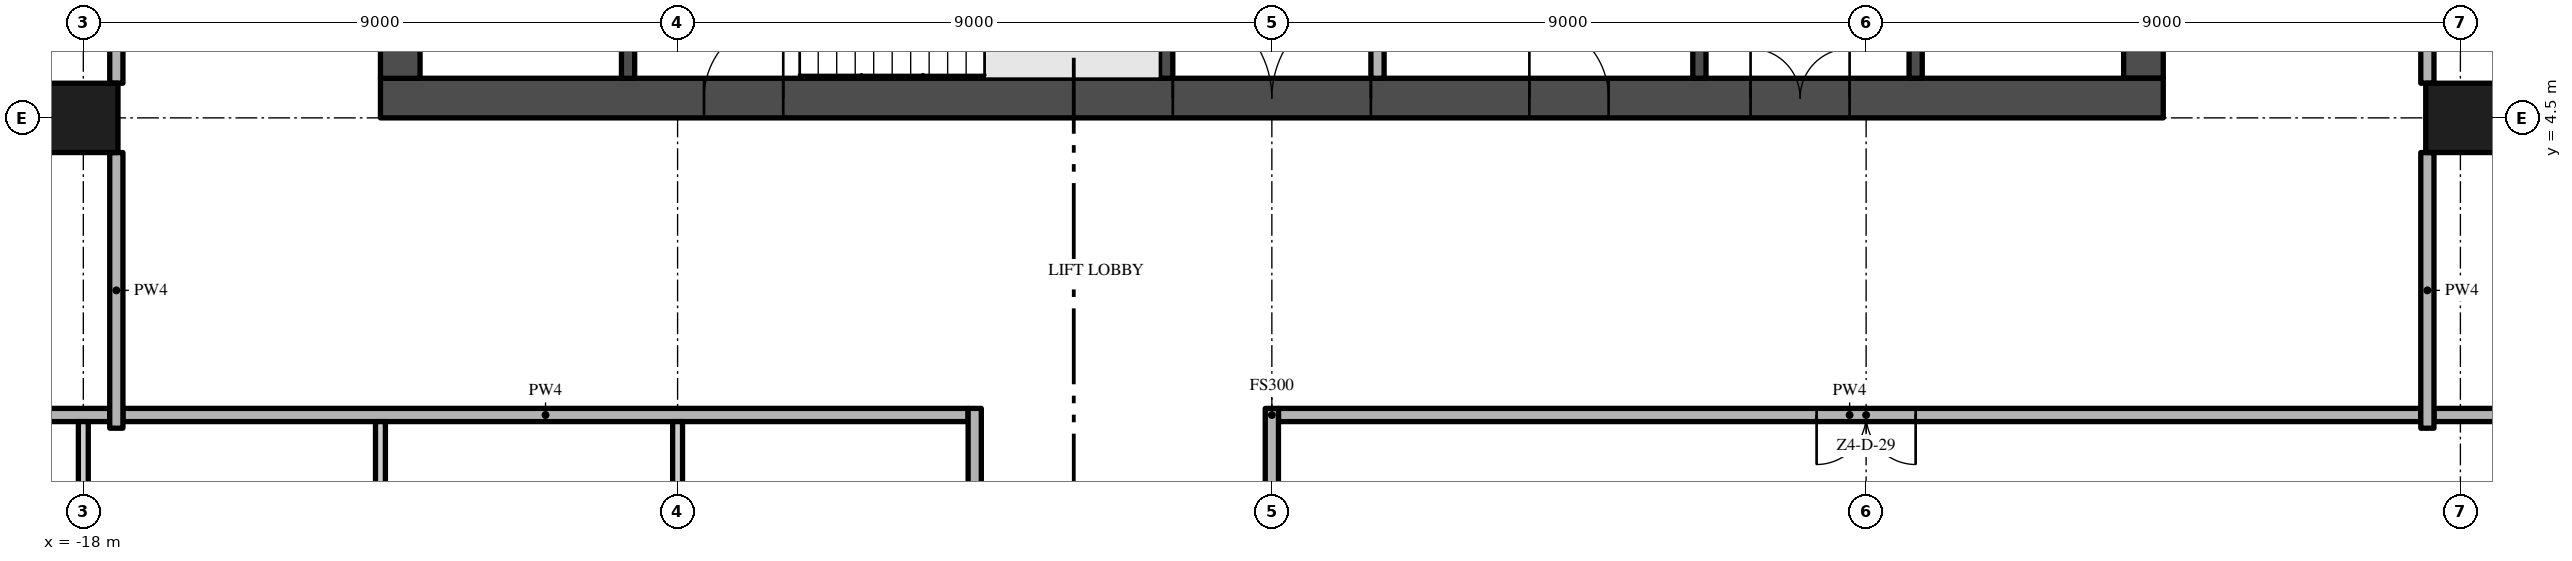
"""IFC4 building model, lengths in metres.
Left out: names, types, materials, properties, quantities, classifications, styles, units other than length and angle.
Written with IfcOpenShell. Run it as: python <this file> out.ifc"""

import sys

from ifc_helpers import new_model, si_unit, direction, frame, frame_2d, origin, origin_2d, place, context, subcontext, project, spatial, rectangle, extrude, element, fill, save


model = new_model("IFC4")
c1 = context("Model", 3, precision=1e-05, world=origin(), true_north=direction((0.0, 1.0)))
c2 = subcontext(c1, "Body", "Model", "MODEL_VIEW")
j1 = project(units=[si_unit("LENGTHUNIT", "METRE"), si_unit("PLANEANGLEUNIT", "RADIAN")], contexts=[c1])
p1 = place(None, origin())
s1 = spatial("IfcSite", under=j1, at=p1, CompositionType="ELEMENT")
p2 = place(p1, origin())
s2 = spatial("IfcBuilding", under=s1, at=p2, CompositionType="ELEMENT")
p3 = place(p2, frame((0.0, 0.0, 222.4)))
s3 = spatial("IfcBuildingStorey", under=s2, at=p3, CompositionType="ELEMENT", Elevation=222.4)
p4 = place(p3, frame((-13.5, 4.8, -0.3), z_axis=(0.0, 0.0, 1.0), x_axis=(1.0, 0.0, 0.0)))
e1 = element("IfcWall", 1, at=p4, inside=s3, PredefinedType="SHEAR", context=c2, shape_type="SweptSolid", body=[
    extrude(rectangle(XDim=27.0, YDim=0.6, at=frame_2d((13.5, 0.0))), origin(), (0.0, 0.0, 1.0), 3.8),
])
p5 = place(p4, frame((12.0, 0.0, 0.3)))
e2 = element("IfcOpeningElement", 2, at=p5, cuts=e1, PredefinedType="OPENING", context=c2, shape_type="SweptSolid", body=[
    extrude(rectangle(XDim=3.0, YDim=2.4, at=frame_2d((1.5, 1.2))), frame((0.0, 0.31, 0.0), z_axis=(0.0, -1.0, 0.0), x_axis=(1.0, 0.0, 0.0)), (0.0, 0.0, 1.0), 0.62),
])
p6 = place(p4, frame((4.9, 0.0, 0.3)))
e3 = element("IfcOpeningElement", 3, at=p6, cuts=e1, PredefinedType="OPENING", context=c2, shape_type="SweptSolid", body=[
    extrude(rectangle(XDim=1.2, YDim=2.2, at=frame_2d((0.6, 1.1))), frame((0.0, 0.31, 0.0), z_axis=(0.0, -1.0, 0.0), x_axis=(1.0, 0.0, 0.0)), (0.0, 0.0, 1.0), 0.62),
])
p7 = place(p4, frame((20.75, 0.0, 0.3)))
e4 = element("IfcOpeningElement", 4, at=p7, cuts=e1, PredefinedType="OPENING", context=c2, shape_type="SweptSolid", body=[
    extrude(rectangle(XDim=1.5, YDim=2.2, at=frame_2d((0.75, 1.1))), frame((0.0, 0.31, 0.0), z_axis=(0.0, -1.0, 0.0), x_axis=(1.0, 0.0, 0.0)), (0.0, 0.0, 1.0), 0.62),
])
p8 = place(p4, frame((17.4, 0.0, 0.3)))
e5 = element("IfcOpeningElement", 5, at=p8, cuts=e1, PredefinedType="OPENING", context=c2, shape_type="SweptSolid", body=[
    extrude(rectangle(XDim=1.2, YDim=2.2, at=frame_2d((0.6, 1.1))), frame((0.0, 0.31, 0.0), z_axis=(0.0, -1.0, 0.0), x_axis=(1.0, 0.0, 0.0)), (0.0, 0.0, 1.0), 0.62),
])
p9 = place(p3, frame((13.2, 5.1, -0.3), z_axis=(0.0, 0.0, 1.0), x_axis=(0.0, 1.0, 0.0)))
e6 = element("IfcWall", 6, at=p9, inside=s3, PredefinedType="SHEAR", context=c2, shape_type="SweptSolid", body=[
    extrude(rectangle(XDim=16.8, YDim=0.6, at=frame_2d((8.4, 0.0))), origin(), (0.0, 0.0, 1.0), 3.8),
])
p10 = place(p9, frame((6.3, 0.0, 0.3)))
e7 = element("IfcOpeningElement", 7, at=p10, cuts=e6, PredefinedType="OPENING", context=c2, shape_type="SweptSolid", body=[
    extrude(rectangle(XDim=1.2, YDim=2.2, at=frame_2d((0.6, 1.1))), frame((0.0, 0.31, 0.0), z_axis=(0.0, -1.0, 0.0), x_axis=(1.0, 0.0, 0.0)), (0.0, 0.0, 1.0), 0.62),
])
p11 = place(p3, frame((-13.2, 21.9, -0.3), z_axis=(0.0, 0.0, 1.0), x_axis=(0.0, -1.0, 0.0)))
e8 = element("IfcWall", 8, at=p11, inside=s3, PredefinedType="SHEAR", context=c2, shape_type="SweptSolid", body=[
    extrude(rectangle(XDim=16.8, YDim=0.6, at=frame_2d((8.4, 0.0))), origin(), (0.0, 0.0, 1.0), 3.8),
])
p12 = place(p11, frame((9.3, 0.0, 0.3)))
e9 = element("IfcOpeningElement", 9, at=p12, cuts=e8, PredefinedType="OPENING", context=c2, shape_type="SweptSolid", body=[
    extrude(rectangle(XDim=1.2, YDim=2.2, at=frame_2d((0.6, 1.1))), frame((0.0, 0.31, 0.0), z_axis=(0.0, -1.0, 0.0), x_axis=(1.0, 0.0, 0.0)), (0.0, 0.0, 1.0), 0.62),
])
for number, where, z_axis, x_axis in (
    (10, (-18.0, 4.5, 0.0), (0.0, 0.0, 1.0), (1.0, 0.0, 0.0)),
    (11, (18.0, 4.5, 0.0), (0.0, 0.0, 1.0), (1.0, 0.0, 0.0)),
):
    element("IfcColumn", number, at=place(p3, frame(where, z_axis=z_axis, x_axis=x_axis)), inside=s3, PredefinedType="COLUMN", context=c2, shape_type="SweptSolid", body=[
        extrude(rectangle(XDim=1.05, YDim=1.05, at=origin_2d()), origin(), (0.0, 0.0, 1.0), 3.5),
    ])
for number, where, z_axis, x_axis in (
    (12, (-9.75, 5.1, 0.0), (0.0, 0.0, 1.0), (0.0, 1.0, 0.0)),
    (13, (-1.6, 5.1, 0.0), (0.0, 0.0, 1.0), (0.0, 1.0, 0.0)),
):
    element("IfcWall", number, at=place(p3, frame(where, z_axis=z_axis, x_axis=x_axis)), inside=s3, PredefinedType="SHEAR", context=c2, shape_type="SweptSolid", body=[
        extrude(rectangle(XDim=2.85, YDim=0.2, at=frame_2d((1.425, 0.0))), origin(), (0.0, 0.0, 1.0), 3.5),
    ])
p13 = place(p3, frame((1.6, 7.5, 0.0), z_axis=(0.0, 0.0, 1.0), x_axis=(0.0, -1.0, 0.0)))
e14 = element("IfcWall", 14, at=p13, inside=s3, PredefinedType="PARTITIONING", context=c2, shape_type="SweptSolid", body=[
    extrude(rectangle(XDim=2.4, YDim=0.2, at=frame_2d((1.2, 0.0))), origin(), (0.0, 0.0, 1.0), 3.5),
])
p14 = place(p13, frame((0.35, 0.0, 0.0)))
e15 = element("IfcOpeningElement", 15, at=p14, cuts=e14, PredefinedType="OPENING", context=c2, shape_type="SweptSolid", body=[
    extrude(rectangle(XDim=0.9, YDim=2.1, at=frame_2d((0.45, 1.05))), frame((0.0, 0.11, 0.0), z_axis=(0.0, -1.0, 0.0), x_axis=(1.0, 0.0, 0.0)), (0.0, 0.0, 1.0), 0.22),
])
p15 = place(p3, frame((6.475, 5.1, 0.0), z_axis=(0.0, 0.0, 1.0), x_axis=(0.0, 1.0, 0.0)))
e16 = element("IfcWall", 16, at=p15, inside=s3, PredefinedType="SHEAR", context=c2, shape_type="SweptSolid", body=[
    extrude(rectangle(XDim=2.4, YDim=0.2, at=frame_2d((1.2, 0.0))), origin(), (0.0, 0.0, 1.0), 3.5),
])
p16 = place(p3, frame((9.75, 5.1, 0.0), z_axis=(0.0, 0.0, 1.0), x_axis=(0.0, 1.0, 0.0)))
e17 = element("IfcWall", 17, at=p16, inside=s3, PredefinedType="SHEAR", context=c2, shape_type="SweptSolid", body=[
    extrude(rectangle(XDim=2.5, YDim=0.2, at=frame_2d((1.25, 0.0))), origin(), (0.0, 0.0, 1.0), 3.5),
])
p17 = place(p16, frame((0.85, 0.0, 0.0)))
e18 = element("IfcOpeningElement", 18, at=p17, cuts=e17, PredefinedType="OPENING", context=c2, shape_type="SweptSolid", body=[
    extrude(rectangle(XDim=1.1, YDim=2.1, at=frame_2d((0.55, 1.05))), frame((0.0, 0.11, 0.0), z_axis=(0.0, -1.0, 0.0), x_axis=(1.0, 0.0, 0.0)), (0.0, 0.0, 1.0), 0.22),
])
p18 = place(p3, frame((-17.4, 0.0, 0.0), z_axis=(0.0, 0.0, 1.0), x_axis=(1.0, 0.0, 0.0)))
e19 = element("IfcWall", 19, at=p18, inside=s3, PredefinedType="PARTITIONING", context=c2, shape_type="SweptSolid", body=[
    extrude(rectangle(XDim=12.8, YDim=0.2, at=frame_2d((6.4, 0.0))), origin(), (0.0, 0.0, 1.0), 3.5),
])
p19 = place(p3, frame((17.4, 0.0, 0.0), z_axis=(0.0, 0.0, 1.0), x_axis=(-1.0, 0.0, 0.0)))
e20 = element("IfcWall", 20, at=p19, inside=s3, PredefinedType="PARTITIONING", context=c2, shape_type="SweptSolid", body=[
    extrude(rectangle(XDim=17.3, YDim=0.2, at=frame_2d((8.65, 0.0))), origin(), (0.0, 0.0, 1.0), 3.5),
])
p20 = place(p19, frame((7.65, 0.0, 0.0)))
e21 = element("IfcOpeningElement", 21, at=p20, cuts=e20, PredefinedType="OPENING", context=c2, shape_type="SweptSolid", body=[
    extrude(rectangle(XDim=1.5, YDim=2.4, at=frame_2d((0.75, 1.2))), frame((0.0, 0.11, 0.0), z_axis=(0.0, -1.0, 0.0), x_axis=(1.0, 0.0, 0.0)), (0.0, 0.0, 1.0), 0.22),
])
for number, where, z_axis, x_axis in (
    (22, (-26.7, 0.0, 0.0), (0.0, 0.0, 1.0), (1.0, 0.0, 0.0)),
    (23, (17.6, 0.0, 0.0), (0.0, 0.0, 1.0), (1.0, 0.0, 0.0)),
):
    element("IfcWall", number, at=place(p3, frame(where, z_axis=z_axis, x_axis=x_axis)), inside=s3, PredefinedType="PARTITIONING", context=c2, shape_type="SweptSolid", body=[
        extrude(rectangle(XDim=9.1, YDim=0.2, at=frame_2d((4.55, 0.0))), origin(), (0.0, 0.0, 1.0), 3.5),
    ])
p21 = place(p3, frame((-18.0, -3.975, 0.0), z_axis=(0.0, 0.0, 1.0), x_axis=(0.0, 1.0, 0.0)))
e24 = element("IfcWall", 24, at=p21, inside=s3, PredefinedType="PARTITIONING", context=c2, shape_type="SweptSolid", body=[
    extrude(rectangle(XDim=3.875, YDim=0.15, at=frame_2d((1.938, 0.0))), origin(), (0.0, 0.0, 1.0), 3.5),
])
p22 = place(p21, frame((1.0, 0.0, 0.0)))
e25 = element("IfcOpeningElement", 25, at=p22, cuts=e24, PredefinedType="OPENING", context=c2, shape_type="SweptSolid", body=[
    extrude(rectangle(XDim=1.5, YDim=2.4, at=frame_2d((0.75, 1.2))), frame((0.0, 0.085, 0.0), z_axis=(0.0, -1.0, 0.0), x_axis=(1.0, 0.0, 0.0)), (0.0, 0.0, 1.0), 0.17),
])
p23 = place(p3, frame((-17.5, -0.2, 0.0), z_axis=(0.0, 0.0, 1.0), x_axis=(0.0, 1.0, 0.0)))
e26 = element("IfcWall", 26, at=p23, inside=s3, PredefinedType="PARTITIONING", context=c2, shape_type="SweptSolid", body=[
    extrude(rectangle(XDim=4.175, YDim=0.2, at=frame_2d((2.087, 0.0))), origin(), (0.0, 0.0, 1.0), 3.5),
])
p24 = place(p3, frame((-17.5, 5.025, 0.0), z_axis=(0.0, 0.0, 1.0), x_axis=(0.0, 1.0, 0.0)))
e27 = element("IfcWall", 27, at=p24, inside=s3, PredefinedType="PARTITIONING", context=c2, shape_type="SweptSolid", body=[
    extrude(rectangle(XDim=7.95, YDim=0.2, at=frame_2d((3.975, 0.0))), origin(), (0.0, 0.0, 1.0), 3.5),
])
p25 = place(p3, frame((-13.5, -0.1, 0.0), z_axis=(0.0, 0.0, 1.0), x_axis=(0.0, -1.0, 0.0)))
e28 = element("IfcWall", 28, at=p25, inside=s3, PredefinedType="PARTITIONING", context=c2, shape_type="SweptSolid", body=[
    extrude(rectangle(XDim=8.525, YDim=0.15, at=frame_2d((4.263, 0.0))), origin(), (0.0, 0.0, 1.0), 3.5),
])
p26 = place(p25, frame((4.0, 0.0, 0.0)))
e29 = element("IfcOpeningElement", 29, at=p26, cuts=e28, PredefinedType="OPENING", context=c2, shape_type="SweptSolid", body=[
    extrude(rectangle(XDim=0.8, YDim=2.0, at=frame_2d((0.4, 1.0))), frame((0.0, 0.085, 0.0), z_axis=(0.0, -1.0, 0.0), x_axis=(1.0, 0.0, 0.0)), (0.0, 0.0, 1.0), 0.17),
])
p27 = place(p3, frame((-9.0, -3.975, 0.0), z_axis=(0.0, 0.0, 1.0), x_axis=(0.0, 1.0, 0.0)))
e30 = element("IfcWall", 30, at=p27, inside=s3, PredefinedType="PARTITIONING", context=c2, shape_type="SweptSolid", body=[
    extrude(rectangle(XDim=3.875, YDim=0.15, at=frame_2d((1.938, 0.0))), origin(), (0.0, 0.0, 1.0), 3.5),
])
p28 = place(p27, frame((2.025, 0.0, 0.0)))
e31 = element("IfcOpeningElement", 31, at=p28, cuts=e30, PredefinedType="OPENING", context=c2, shape_type="SweptSolid", body=[
    extrude(rectangle(XDim=0.9, YDim=2.1, at=frame_2d((0.45, 1.05))), frame((0.0, 0.085, 0.0), z_axis=(0.0, -1.0, 0.0), x_axis=(1.0, 0.0, 0.0)), (0.0, 0.0, 1.0), 0.17),
])
p29 = place(p3, frame((-4.5, -22.2, 0.0), z_axis=(0.0, 0.0, 1.0), x_axis=(0.0, 1.0, 0.0)))
e32 = element("IfcWall", 32, at=p29, inside=s3, PredefinedType="PARTITIONING", context=c2, shape_type="SweptSolid", body=[
    extrude(rectangle(XDim=22.3, YDim=0.2, at=frame_2d((11.15, 0.0))), origin(), (0.0, 0.0, 1.0), 3.5),
])
p30 = place(p29, frame((10.2, 0.0, 0.0)))
e33 = element("IfcOpeningElement", 33, at=p30, cuts=e32, PredefinedType="OPENING", context=c2, shape_type="SweptSolid", body=[
    extrude(rectangle(XDim=1.5, YDim=2.4, at=frame_2d((0.75, 1.2))), frame((0.0, 0.11, 0.0), z_axis=(0.0, -1.0, 0.0), x_axis=(1.0, 0.0, 0.0)), (0.0, 0.0, 1.0), 0.22),
])
p31 = place(p3, frame((0.0, -3.975, 0.0), z_axis=(0.0, 0.0, 1.0), x_axis=(0.0, 1.0, 0.0)))
e34 = element("IfcWall", 34, at=p31, inside=s3, PredefinedType="PARTITIONING", context=c2, shape_type="SweptSolid", body=[
    extrude(rectangle(XDim=4.075, YDim=0.2, at=frame_2d((2.038, 0.0))), origin(), (0.0, 0.0, 1.0), 3.5),
])
p32 = place(p3, frame((17.5, -0.2, 0.0), z_axis=(0.0, 0.0, 1.0), x_axis=(0.0, 1.0, 0.0)))
e35 = element("IfcWall", 35, at=p32, inside=s3, PredefinedType="PARTITIONING", context=c2, shape_type="SweptSolid", body=[
    extrude(rectangle(XDim=4.175, YDim=0.2, at=frame_2d((2.087, 0.0))), origin(), (0.0, 0.0, 1.0), 3.5),
])
p33 = place(p3, frame((17.5, 5.025, 0.0), z_axis=(0.0, 0.0, 1.0), x_axis=(0.0, 1.0, 0.0)))
e36 = element("IfcWall", 36, at=p33, inside=s3, PredefinedType="PARTITIONING", context=c2, shape_type="SweptSolid", body=[
    extrude(rectangle(XDim=7.95, YDim=0.2, at=frame_2d((3.975, 0.0))), origin(), (0.0, 0.0, 1.0), 3.5),
])
p34 = place(p5, frame((3.0, 0.0, 0.0), z_axis=(0.0, 0.0, 1.0), x_axis=(-1.0, 0.0, 0.0)))
e37 = element("IfcDoor", 37, at=p34, inside=s3, OperationType="DOUBLE_DOOR_SINGLE_SWING", PredefinedType="DOOR", context=c2, shape_type="SweptSolid", body=[
    extrude(rectangle(XDim=3.0, YDim=2.4, at=frame_2d((1.5, 1.2))), frame((0.0, 0.025, 0.0), z_axis=(0.0, -1.0, 0.0), x_axis=(1.0, 0.0, 0.0)), (0.0, 0.0, 1.0), 0.05),
])
fill(e2, e37)
p35 = place(p6, frame((1.2, 0.0, 0.0), z_axis=(0.0, 0.0, 1.0), x_axis=(-1.0, 0.0, 0.0)))
e38 = element("IfcDoor", 38, at=p35, inside=s3, OperationType="SINGLE_SWING_LEFT", PredefinedType="DOOR", context=c2, shape_type="SweptSolid", body=[
    extrude(rectangle(XDim=1.2, YDim=2.2, at=frame_2d((0.6, 1.1))), frame((0.0, 0.025, 0.0), z_axis=(0.0, -1.0, 0.0), x_axis=(1.0, 0.0, 0.0)), (0.0, 0.0, 1.0), 0.05),
])
fill(e3, e38)
p36 = place(p7, frame((1.5, 0.0, 0.0), z_axis=(0.0, 0.0, 1.0), x_axis=(-1.0, 0.0, 0.0)))
e39 = element("IfcDoor", 39, at=p36, inside=s3, OperationType="DOUBLE_DOOR_SINGLE_SWING", PredefinedType="DOOR", context=c2, shape_type="SweptSolid", body=[
    extrude(rectangle(XDim=1.5, YDim=2.2, at=frame_2d((0.75, 1.1))), frame((0.0, 0.025, 0.0), z_axis=(0.0, -1.0, 0.0), x_axis=(1.0, 0.0, 0.0)), (0.0, 0.0, 1.0), 0.05),
])
fill(e4, e39)
p37 = place(p8, frame((1.2, 0.0, 0.0), z_axis=(0.0, 0.0, 1.0), x_axis=(-1.0, 0.0, 0.0)))
e40 = element("IfcDoor", 40, at=p37, inside=s3, OperationType="SINGLE_SWING_RIGHT", PredefinedType="DOOR", context=c2, shape_type="SweptSolid", body=[
    extrude(rectangle(XDim=1.2, YDim=2.2, at=frame_2d((0.6, 1.1))), frame((0.0, 0.025, 0.0), z_axis=(0.0, -1.0, 0.0), x_axis=(1.0, 0.0, 0.0)), (0.0, 0.0, 1.0), 0.05),
])
fill(e5, e40)
p38 = place(p20, origin())
e41 = element("IfcDoor", 41, at=p38, inside=s3, OperationType="DOUBLE_DOOR_SINGLE_SWING", PredefinedType="DOOR", context=c2, shape_type="SweptSolid", body=[
    extrude(rectangle(XDim=1.5, YDim=2.4, at=frame_2d((0.75, 1.2))), frame((0.0, 0.025, 0.0), z_axis=(0.0, -1.0, 0.0), x_axis=(1.0, 0.0, 0.0)), (0.0, 0.0, 1.0), 0.05),
])
fill(e21, e41)
save(model, sys.argv[1])
